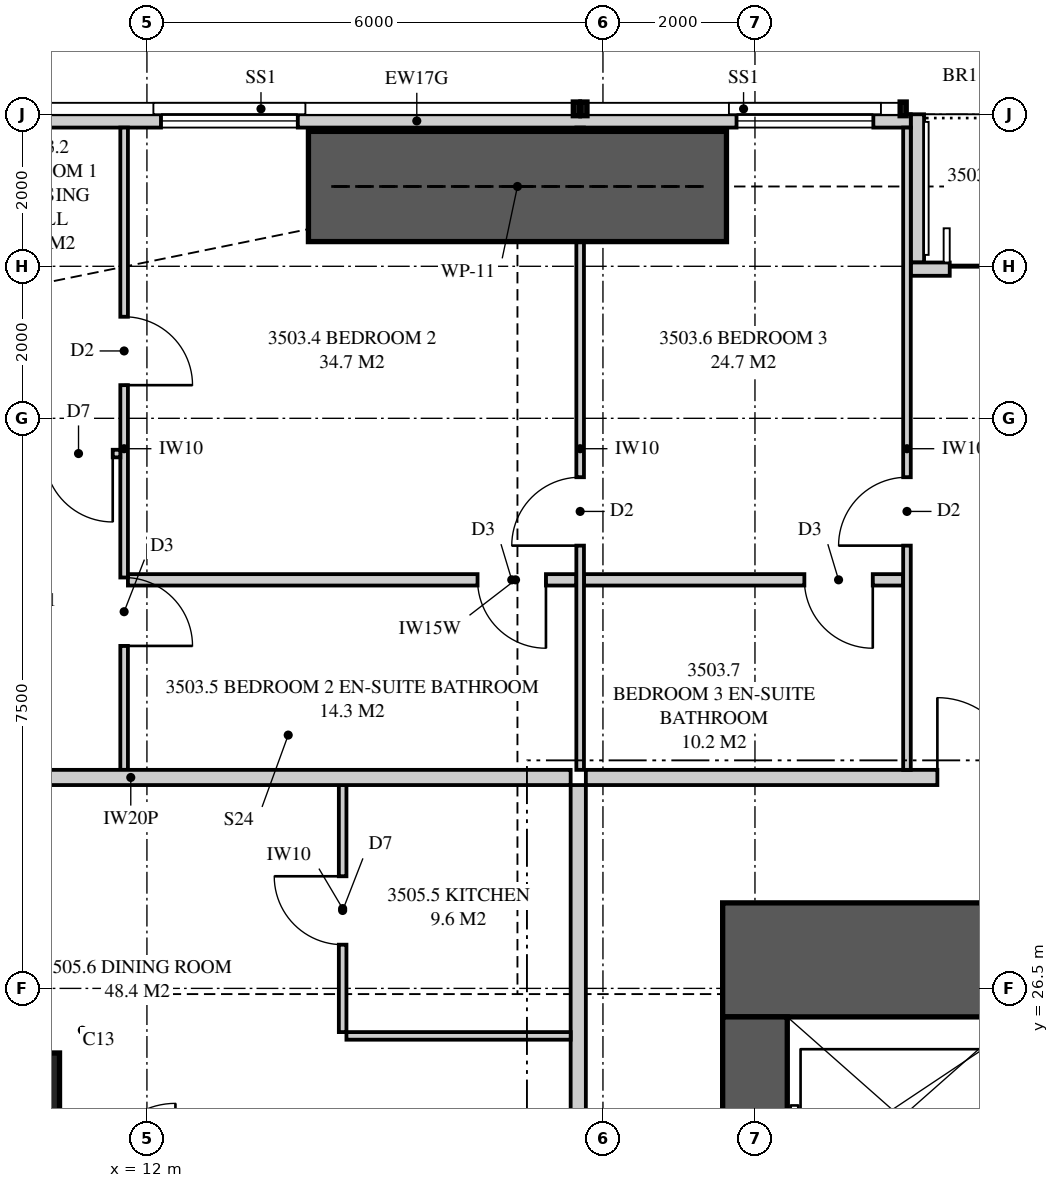
"""IFC4 building model, lengths in metres.
Left out: names, types, materials, properties, quantities, classifications, styles, units other than length and angle.
Written with IfcOpenShell. Run it as: python <this file> out.ifc"""

import sys

from ifc_helpers import new_model, si_unit, direction, frame, frame_2d, origin, origin_2d, place, context, subcontext, project, spatial, polyline, rectangle, outline, extrude, element, fill, save


model = new_model("IFC4")
c1 = context("Model", 3, precision=1e-05, world=origin(), true_north=direction((0.0, 1.0)))
c2 = subcontext(c1, "Body", "Model", "MODEL_VIEW")
j1 = project(units=[si_unit("LENGTHUNIT", "METRE"), si_unit("PLANEANGLEUNIT", "RADIAN")], contexts=[c1])
p1 = place(None, origin())
s1 = spatial("IfcSite", under=j1, at=p1, CompositionType="ELEMENT")
p2 = place(p1, origin())
s2 = spatial("IfcBuilding", under=s1, at=p2, CompositionType="ELEMENT")
p3 = place(p2, frame((0.0, 0.0, 128.3)))
s3 = spatial("IfcBuildingStorey", under=s2, at=p3, CompositionType="ELEMENT", Elevation=128.3)
p4 = place(p3, frame((10.2, 25.0, 0.0), z_axis=(0.0, 0.0, 1.0), x_axis=(1.0, 0.0, 0.0)))
e1 = element("IfcColumn", 1, at=p4, inside=s3, PredefinedType="COLUMN", context=c2, shape_type="SweptSolid", body=[
    extrude(rectangle(XDim=1.3, YDim=1.3, at=origin_2d()), origin(), (0.0, 0.0, 1.0), 3.35),
])
p5 = place(p3, frame((26.0, 26.875, 0.0), z_axis=(0.0, 0.0, 1.0), x_axis=(-1.0, 0.0, 0.0)))
e2 = element("IfcWall", 2, at=p5, inside=s3, PredefinedType="SHEAR", context=c2, shape_type="SweptSolid", body=[
    extrude(rectangle(XDim=6.425, YDim=1.5, at=frame_2d((3.212, 0.0))), origin(), (0.0, 0.0, 1.0), 3.35),
])
p6 = place(p5, frame((0.825, 0.0, 0.0)))
e3 = element("IfcOpeningElement", 3, at=p6, cuts=e2, PredefinedType="OPENING", context=c2, shape_type="SweptSolid", body=[
    extrude(rectangle(XDim=0.75, YDim=2.1, at=frame_2d((0.375, 1.05))), frame((0.0, 0.76, 0.0), z_axis=(0.0, -1.0, 0.0), x_axis=(1.0, 0.0, 0.0)), (0.0, 0.0, 1.0), 1.52),
])
p7 = place(p3, frame((20.0, 26.125, 0.0), z_axis=(0.0, 0.0, 1.0), x_axis=(0.0, -1.0, 0.0)))
e4 = element("IfcWall", 4, at=p7, inside=s3, PredefinedType="SHEAR", context=c2, shape_type="SweptSolid", body=[
    extrude(rectangle(XDim=2.825, YDim=0.85, at=frame_2d((1.413, 0.0))), origin(), (0.0, 0.0, 1.0), 3.35),
])
p8 = place(p3, frame((22.05, 37.913, 0.0), z_axis=(0.0, 0.0, 1.0), x_axis=(-1.0, 0.0, 0.0)))
e5 = element("IfcWall", 5, at=p8, inside=s3, PredefinedType="SOLIDWALL", context=c2, shape_type="SweptSolid", body=[
    extrude(outline(polyline([(0.0, 0.0), (12.999, 0.0), (12.999, 3.11), (5.378, 3.11), (5.378, 2.15), (5.333, 2.15), (5.333, 3.11), (5.175, 3.11), (5.175, 2.15), (0.0, 2.15), (0.0, 0.0)])), frame((0.0, 0.087, 0.0), z_axis=(0.0, -1.0, 0.0), x_axis=(1.0, 0.0, 0.0)), (0.0, 0.0, 1.0), 0.175),
])
p9 = place(p8, frame((0.492, 0.0, 0.4)))
e6 = element("IfcOpeningElement", 6, at=p9, cuts=e5, PredefinedType="OPENING", context=c2, shape_type="SweptSolid", body=[
    extrude(rectangle(XDim=1.8, YDim=1.7, at=frame_2d((0.9, 0.85))), frame((0.0, 0.097, 0.0), z_axis=(0.0, -1.0, 0.0), x_axis=(1.0, 0.0, 0.0)), (0.0, 0.0, 1.0), 0.195),
])
p10 = place(p8, frame((8.065, 0.0, 0.4)))
e7 = element("IfcOpeningElement", 7, at=p10, cuts=e5, PredefinedType="OPENING", context=c2, shape_type="SweptSolid", body=[
    extrude(rectangle(XDim=1.8, YDim=1.7, at=frame_2d((0.9, 0.85))), frame((0.0, 0.097, 0.0), z_axis=(0.0, -1.0, 0.0), x_axis=(1.0, 0.0, 0.0)), (0.0, 0.0, 1.0), 0.195),
])
p11 = place(p3, frame((24.875, 35.962, 0.0), z_axis=(0.0, 0.0, 1.0), x_axis=(-1.0, 0.0, 0.0)))
e8 = element("IfcWall", 8, at=p11, inside=s3, PredefinedType="SOLIDWALL", context=c2, shape_type="SweptSolid", body=[
    extrude(rectangle(XDim=2.825, YDim=0.175, at=frame_2d((1.413, 0.0))), origin(), (0.0, 0.0, 1.0), 3.11),
])
p12 = place(p11, frame((0.512, 0.0, 0.0)))
e9 = element("IfcOpeningElement", 9, at=p12, cuts=e8, PredefinedType="OPENING", context=c2, shape_type="SweptSolid", body=[
    extrude(rectangle(XDim=1.8, YDim=2.1, at=frame_2d((0.9, 1.05))), frame((0.0, 0.097, 0.0), z_axis=(0.0, -1.0, 0.0), x_axis=(1.0, 0.0, 0.0)), (0.0, 0.0, 1.0), 0.195),
])
p13 = place(p3, frame((22.137, 38.0, 0.0), z_axis=(0.0, 0.0, 1.0), x_axis=(0.0, -1.0, 0.0)))
e10 = element("IfcWall", 10, at=p13, inside=s3, PredefinedType="SOLIDWALL", context=c2, shape_type="SweptSolid", body=[
    extrude(outline(polyline([(0.0, 0.0), (1.95, 0.0), (1.95, 3.11), (1.75, 3.11), (1.75, 2.15), (0.15, 2.15), (0.15, 3.11), (0.0, 3.11), (0.0, 0.0)])), frame((0.0, 0.087, 0.0), z_axis=(0.0, -1.0, 0.0), x_axis=(1.0, 0.0, 0.0)), (0.0, 0.0, 1.0), 0.175),
])
p14 = place(p3, frame((17.775, 29.275, 0.0), z_axis=(0.0, 0.0, 1.0), x_axis=(1.0, 0.0, 0.0)))
e11 = element("IfcWall", 11, at=p14, inside=s3, PredefinedType="PARTITIONING", context=c2, shape_type="SweptSolid", body=[
    extrude(outline(polyline([(0.0, 0.0), (11.425, 0.0), (11.425, 3.11), (10.312, 3.11), (10.312, 2.541), (9.638, 2.541), (9.638, 3.11), (0.0, 3.11), (0.0, 0.0)])), frame((0.0, 0.1, 0.0), z_axis=(0.0, -1.0, 0.0), x_axis=(1.0, 0.0, 0.0)), (0.0, 0.0, 1.0), 0.2),
])
p15 = place(p14, frame((4.625, 0.0, 0.0)))
e12 = element("IfcOpeningElement", 12, at=p15, cuts=e11, PredefinedType="OPENING", context=c2, shape_type="SweptSolid", body=[
    extrude(rectangle(XDim=1.05, YDim=2.2, at=frame_2d((0.525, 1.1))), frame((0.0, 0.11, 0.0), z_axis=(0.0, -1.0, 0.0), x_axis=(1.0, 0.0, 0.0)), (0.0, 0.0, 1.0), 0.22),
])
p16 = place(p3, frame((11.7, 37.825, 0.0), z_axis=(0.0, 0.0, 1.0), x_axis=(0.0, -1.0, 0.0)))
e13 = element("IfcWall", 13, at=p16, inside=s3, PredefinedType="PARTITIONING", context=c2, shape_type="SweptSolid", body=[
    extrude(outline(polyline([(0.0, 0.0), (8.45, 0.0), (8.45, 3.11), (2.708, 3.11), (2.708, 2.15), (0.953, 2.15), (0.953, 3.11), (0.0, 3.11), (0.0, 0.0)])), frame((0.0, 0.05, 0.0), z_axis=(0.0, -1.0, 0.0), x_axis=(1.0, 0.0, 0.0)), (0.0, 0.0, 1.0), 0.1),
])
p17 = place(p16, frame((2.489, 0.0, 0.0)))
e14 = element("IfcOpeningElement", 14, at=p17, cuts=e13, PredefinedType="OPENING", context=c2, shape_type="SweptSolid", body=[
    extrude(rectangle(XDim=0.9, YDim=2.1, at=frame_2d((0.45, 1.05))), frame((0.0, 0.06, 0.0), z_axis=(0.0, -1.0, 0.0), x_axis=(1.0, 0.0, 0.0)), (0.0, 0.0, 1.0), 0.12),
])
p18 = place(p16, frame((5.919, 0.0, 0.0)))
e15 = element("IfcOpeningElement", 15, at=p18, cuts=e13, PredefinedType="OPENING", context=c2, shape_type="SweptSolid", body=[
    extrude(rectangle(XDim=0.9, YDim=2.1, at=frame_2d((0.45, 1.05))), frame((0.0, 0.06, 0.0), z_axis=(0.0, -1.0, 0.0), x_axis=(1.0, 0.0, 0.0)), (0.0, 0.0, 1.0), 0.12),
])
p19 = place(p3, frame((17.7, 37.825, 0.0), z_axis=(0.0, 0.0, 1.0), x_axis=(0.0, -1.0, 0.0)))
e16 = element("IfcWall", 16, at=p19, inside=s3, PredefinedType="PARTITIONING", context=c2, shape_type="SweptSolid", body=[
    extrude(outline(polyline([(1.635, 2.15), (0.0, 2.15), (0.0, 0.0), (8.45, 0.0), (8.45, 3.11), (1.635, 3.11), (1.635, 2.15)]), holes=[polyline([(1.021, 0.116), (0.529, 0.116), (0.529, 0.906), (1.021, 0.906), (1.021, 0.116)]), polyline([(1.021, 1.244), (0.529, 1.244), (0.529, 2.034), (1.021, 2.034), (1.021, 1.244)])]), frame((0.0, 0.05, 0.0), z_axis=(0.0, -1.0, 0.0), x_axis=(1.0, 0.0, 0.0)), (0.0, 0.0, 1.0), 0.1),
])
p20 = place(p19, frame((4.6, 0.0, 0.0)))
e17 = element("IfcOpeningElement", 17, at=p20, cuts=e16, PredefinedType="OPENING", context=c2, shape_type="SweptSolid", body=[
    extrude(rectangle(XDim=0.9, YDim=2.1, at=frame_2d((0.45, 1.05))), frame((0.0, 0.06, 0.0), z_axis=(0.0, -1.0, 0.0), x_axis=(1.0, 0.0, 0.0)), (0.0, 0.0, 1.0), 0.12),
])
p21 = place(p3, frame((22.0, 37.825, 0.0), z_axis=(0.0, 0.0, 1.0), x_axis=(0.0, -1.0, 0.0)))
e18 = element("IfcWall", 18, at=p21, inside=s3, PredefinedType="PARTITIONING", context=c2, shape_type="SweptSolid", body=[
    extrude(outline(polyline([(0.0, 0.0), (8.45, 0.0), (8.45, 3.11), (1.635, 3.11), (1.635, 2.15), (0.0, 2.15), (0.0, 3.11), (0.0, 0.0)])), frame((0.0, 0.05, 0.0), z_axis=(0.0, -1.0, 0.0), x_axis=(1.0, 0.0, 0.0)), (0.0, 0.0, 1.0), 0.1),
])
p22 = place(p21, frame((4.6, 0.0, 0.0)))
e19 = element("IfcOpeningElement", 19, at=p22, cuts=e18, PredefinedType="OPENING", context=c2, shape_type="SweptSolid", body=[
    extrude(rectangle(XDim=0.9, YDim=2.1, at=frame_2d((0.45, 1.05))), frame((0.0, 0.06, 0.0), z_axis=(0.0, -1.0, 0.0), x_axis=(1.0, 0.0, 0.0)), (0.0, 0.0, 1.0), 0.12),
])
p23 = place(p3, frame((6.0, 33.536, 0.0), z_axis=(0.0, 0.0, 1.0), x_axis=(1.0, 0.0, 0.0)))
e20 = element("IfcWall", 20, at=p23, inside=s3, PredefinedType="PARTITIONING", context=c2, shape_type="SweptSolid", body=[
    extrude(outline(polyline([(0.0, 0.0), (5.65, 0.0), (5.65, 3.11), (5.46, 3.11), (5.46, 2.51), (3.206, 2.51), (3.206, 2.15), (1.463, 2.15), (1.463, 3.11), (0.0, 3.11), (0.0, 0.0)])), frame((0.0, 0.05, 0.0), z_axis=(0.0, -1.0, 0.0), x_axis=(1.0, 0.0, 0.0)), (0.0, 0.0, 1.0), 0.1),
])
p24 = place(p23, frame((4.65, 0.0, 0.0)))
e21 = element("IfcOpeningElement", 21, at=p24, cuts=e20, PredefinedType="OPENING", context=c2, shape_type="SweptSolid", body=[
    extrude(rectangle(XDim=0.9, YDim=2.1, at=frame_2d((0.45, 1.05))), frame((0.0, 0.06, 0.0), z_axis=(0.0, -1.0, 0.0), x_axis=(1.0, 0.0, 0.0)), (0.0, 0.0, 1.0), 0.12),
])
p25 = place(p3, frame((11.75, 31.875, 0.0), z_axis=(0.0, 0.0, 1.0), x_axis=(1.0, 0.0, 0.0)))
e22 = element("IfcWall", 22, at=p25, inside=s3, PredefinedType="PLUMBINGWALL", context=c2, shape_type="SweptSolid", body=[
    extrude(outline(polyline([(0.0, 0.0), (5.9, 0.0), (5.9, 3.11), (5.438, 3.11), (5.438, 2.541), (4.812, 2.541), (4.812, 3.11), (0.0, 3.11), (0.0, 0.0)])), frame((0.0, 0.075, 0.0), z_axis=(0.0, -1.0, 0.0), x_axis=(1.0, 0.0, 0.0)), (0.0, 0.0, 1.0), 0.15),
])
p26 = place(p25, frame((4.6, 0.0, 0.0)))
e23 = element("IfcOpeningElement", 23, at=p26, cuts=e22, PredefinedType="OPENING", context=c2, shape_type="SweptSolid", body=[
    extrude(rectangle(XDim=0.9, YDim=2.1, at=frame_2d((0.45, 1.05))), frame((0.0, 0.085, 0.0), z_axis=(0.0, -1.0, 0.0), x_axis=(1.0, 0.0, 0.0)), (0.0, 0.0, 1.0), 0.17),
])
p27 = place(p3, frame((17.75, 31.875, 0.0), z_axis=(0.0, 0.0, 1.0), x_axis=(1.0, 0.0, 0.0)))
e24 = element("IfcWall", 24, at=p27, inside=s3, PredefinedType="PLUMBINGWALL", context=c2, shape_type="SweptSolid", body=[
    extrude(rectangle(XDim=4.2, YDim=0.15, at=frame_2d((2.1, 0.0))), origin(), (0.0, 0.0, 1.0), 3.11),
])
p28 = place(p27, frame((2.9, 0.0, 0.0)))
e25 = element("IfcOpeningElement", 25, at=p28, cuts=e24, PredefinedType="OPENING", context=c2, shape_type="SweptSolid", body=[
    extrude(rectangle(XDim=0.9, YDim=2.1, at=frame_2d((0.45, 1.05))), frame((0.0, 0.085, 0.0), z_axis=(0.0, -1.0, 0.0), x_axis=(1.0, 0.0, 0.0)), (0.0, 0.0, 1.0), 0.17),
])
p29 = place(p3, frame((6.0, 29.275, 0.0), z_axis=(0.0, 0.0, 1.0), x_axis=(1.0, 0.0, 0.0)))
e26 = element("IfcWall", 26, at=p29, inside=s3, PredefinedType="PARTITIONING", context=c2, shape_type="SweptSolid", body=[
    extrude(outline(polyline([(0.0, 0.0), (11.575, 0.0), (11.575, 3.11), (11.212, 3.11), (11.212, 2.541), (10.538, 2.541), (10.538, 3.11), (5.51, 3.11), (5.51, 2.51), (2.969, 2.51), (2.969, 2.541), (2.565, 2.541), (2.565, 2.15), (0.721, 2.15), (0.721, 3.11), (0.0, 3.11), (0.0, 0.0)])), frame((0.0, 0.1, 0.0), z_axis=(0.0, -1.0, 0.0), x_axis=(1.0, 0.0, 0.0)), (0.0, 0.0, 1.0), 0.2),
])
p30 = place(p3, frame((14.575, 25.925, 0.0), z_axis=(0.0, 0.0, 1.0), x_axis=(0.0, 1.0, 0.0)))
e27 = element("IfcWall", 27, at=p30, inside=s3, PredefinedType="PARTITIONING", context=c2, shape_type="SweptSolid", body=[
    extrude(outline(polyline([(0.0, 0.0), (3.25, 0.0), (3.25, 3.11), (0.787, 3.11), (0.787, 2.541), (0.213, 2.541), (0.213, 3.11), (0.0, 3.11), (0.0, 0.0)])), frame((0.0, 0.05, 0.0), z_axis=(0.0, -1.0, 0.0), x_axis=(1.0, 0.0, 0.0)), (0.0, 0.0, 1.0), 0.1),
])
p31 = place(p30, frame((1.15, 0.0, 0.0)))
e28 = element("IfcOpeningElement", 28, at=p31, cuts=e27, PredefinedType="OPENING", context=c2, shape_type="SweptSolid", body=[
    extrude(rectangle(XDim=0.9, YDim=2.1, at=frame_2d((0.45, 1.05))), frame((0.0, 0.06, 0.0), z_axis=(0.0, -1.0, 0.0), x_axis=(1.0, 0.0, 0.0)), (0.0, 0.0, 1.0), 0.12),
])
p32 = place(p3, frame((14.625, 25.875, 0.0), z_axis=(0.0, 0.0, 1.0), x_axis=(1.0, 0.0, 0.0)))
e29 = element("IfcWall", 29, at=p32, inside=s3, PredefinedType="PARTITIONING", context=c2, shape_type="SweptSolid", body=[
    extrude(rectangle(XDim=2.95, YDim=0.1, at=frame_2d((1.475, 0.0))), origin(), (0.0, 0.0, 1.0), 3.11),
])
p33 = place(p3, frame((17.675, 23.613, 0.0), z_axis=(0.0, 0.0, 1.0), x_axis=(0.0, 1.0, 0.0)))
e30 = element("IfcWall", 30, at=p33, inside=s3, PredefinedType="PARTITIONING", context=c2, shape_type="SweptSolid", body=[
    extrude(outline(polyline([(0.0, 0.0), (5.562, 0.0), (5.562, 3.11), (3.15, 3.11), (3.15, 2.541), (2.475, 2.541), (2.475, 3.11), (0.0, 3.11), (0.0, 0.0)])), frame((0.0, 0.1, 0.0), z_axis=(0.0, -1.0, 0.0), x_axis=(1.0, 0.0, 0.0)), (0.0, 0.0, 1.0), 0.2),
])
p34 = place(p3, frame((14.125, 37.05, 0.0), z_axis=(0.0, 0.0, 1.0), x_axis=(1.0, 0.0, 0.0)))
e31 = element("IfcWall", 31, at=p34, inside=s3, PredefinedType="SHEAR", context=c2, shape_type="SweptSolid", body=[
    extrude(rectangle(XDim=5.5, YDim=1.45, at=frame_2d((2.75, 0.0))), origin(), (0.0, 0.0, 1.0), 3.35),
])
p35 = place(p12, origin())
e32 = element("IfcDoor", 32, at=p35, inside=s3, OperationType="SLIDING_TO_LEFT", PredefinedType="DOOR", context=c2, shape_type="SweptSolid", body=[
    extrude(rectangle(XDim=1.8, YDim=2.1, at=frame_2d((0.9, 1.05))), frame((0.0, 0.025, 0.0), z_axis=(0.0, -1.0, 0.0), x_axis=(1.0, 0.0, 0.0)), (0.0, 0.0, 1.0), 0.05),
])
fill(e9, e32)
p36 = place(p9, origin())
e33 = element("IfcWindow", 33, at=p36, inside=s3, PartitioningType="SINGLE_PANEL", PredefinedType="WINDOW", context=c2, shape_type="SweptSolid", body=[
    extrude(rectangle(XDim=1.8, YDim=1.7, at=frame_2d((0.9, 0.85))), frame((0.0, 0.03, 0.0), z_axis=(0.0, -1.0, 0.0), x_axis=(1.0, 0.0, 0.0)), (0.0, 0.0, 1.0), 0.06),
])
fill(e6, e33)
p37 = place(p10, origin())
e34 = element("IfcWindow", 34, at=p37, inside=s3, PartitioningType="SINGLE_PANEL", PredefinedType="WINDOW", context=c2, shape_type="SweptSolid", body=[
    extrude(rectangle(XDim=1.8, YDim=1.7, at=frame_2d((0.9, 0.85))), frame((0.0, 0.03, 0.0), z_axis=(0.0, -1.0, 0.0), x_axis=(1.0, 0.0, 0.0)), (0.0, 0.0, 1.0), 0.06),
])
fill(e7, e34)
p38 = place(p15, origin())
e35 = element("IfcDoor", 35, at=p38, inside=s3, OperationType="SINGLE_SWING_LEFT", PredefinedType="DOOR", context=c2, shape_type="SweptSolid", body=[
    extrude(rectangle(XDim=1.05, YDim=2.2, at=frame_2d((0.525, 1.1))), frame((0.0, 0.025, 0.0), z_axis=(0.0, -1.0, 0.0), x_axis=(1.0, 0.0, 0.0)), (0.0, 0.0, 1.0), 0.05),
])
fill(e12, e35)
p39 = place(p24, frame((0.9, 0.0, 0.0), z_axis=(0.0, 0.0, 1.0), x_axis=(-1.0, 0.0, 0.0)))
e36 = element("IfcDoor", 36, at=p39, inside=s3, OperationType="SINGLE_SWING_LEFT", PredefinedType="DOOR", context=c2, shape_type="SweptSolid", body=[
    extrude(rectangle(XDim=0.9, YDim=2.1, at=frame_2d((0.45, 1.05))), frame((0.0, 0.025, 0.0), z_axis=(0.0, -1.0, 0.0), x_axis=(1.0, 0.0, 0.0)), (0.0, 0.0, 1.0), 0.05),
])
fill(e21, e36)
p40 = place(p17, origin())
e37 = element("IfcDoor", 37, at=p40, inside=s3, OperationType="SINGLE_SWING_RIGHT", PredefinedType="DOOR", context=c2, shape_type="SweptSolid", body=[
    extrude(rectangle(XDim=0.9, YDim=2.1, at=frame_2d((0.45, 1.05))), frame((0.0, 0.025, 0.0), z_axis=(0.0, -1.0, 0.0), x_axis=(1.0, 0.0, 0.0)), (0.0, 0.0, 1.0), 0.05),
])
fill(e14, e37)
p41 = place(p20, frame((0.9, 0.0, 0.0), z_axis=(0.0, 0.0, 1.0), x_axis=(-1.0, 0.0, 0.0)))
e38 = element("IfcDoor", 38, at=p41, inside=s3, OperationType="SINGLE_SWING_LEFT", PredefinedType="DOOR", context=c2, shape_type="SweptSolid", body=[
    extrude(rectangle(XDim=0.9, YDim=2.1, at=frame_2d((0.45, 1.05))), frame((0.0, 0.025, 0.0), z_axis=(0.0, -1.0, 0.0), x_axis=(1.0, 0.0, 0.0)), (0.0, 0.0, 1.0), 0.05),
])
fill(e17, e38)
p42 = place(p26, frame((0.9, 0.0, 0.0), z_axis=(0.0, 0.0, 1.0), x_axis=(-1.0, 0.0, 0.0)))
e39 = element("IfcDoor", 39, at=p42, inside=s3, OperationType="SINGLE_SWING_LEFT", PredefinedType="DOOR", context=c2, shape_type="SweptSolid", body=[
    extrude(rectangle(XDim=0.9, YDim=2.1, at=frame_2d((0.45, 1.05))), frame((0.0, 0.025, 0.0), z_axis=(0.0, -1.0, 0.0), x_axis=(1.0, 0.0, 0.0)), (0.0, 0.0, 1.0), 0.05),
])
fill(e23, e39)
p43 = place(p22, frame((0.9, 0.0, 0.0), z_axis=(0.0, 0.0, 1.0), x_axis=(-1.0, 0.0, 0.0)))
e40 = element("IfcDoor", 40, at=p43, inside=s3, OperationType="SINGLE_SWING_LEFT", PredefinedType="DOOR", context=c2, shape_type="SweptSolid", body=[
    extrude(rectangle(XDim=0.9, YDim=2.1, at=frame_2d((0.45, 1.05))), frame((0.0, 0.025, 0.0), z_axis=(0.0, -1.0, 0.0), x_axis=(1.0, 0.0, 0.0)), (0.0, 0.0, 1.0), 0.05),
])
fill(e19, e40)
p44 = place(p28, frame((0.9, 0.0, 0.0), z_axis=(0.0, 0.0, 1.0), x_axis=(-1.0, 0.0, 0.0)))
e41 = element("IfcDoor", 41, at=p44, inside=s3, OperationType="SINGLE_SWING_LEFT", PredefinedType="DOOR", context=c2, shape_type="SweptSolid", body=[
    extrude(rectangle(XDim=0.9, YDim=2.1, at=frame_2d((0.45, 1.05))), frame((0.0, 0.025, 0.0), z_axis=(0.0, -1.0, 0.0), x_axis=(1.0, 0.0, 0.0)), (0.0, 0.0, 1.0), 0.05),
])
fill(e25, e41)
p45 = place(p18, origin())
e42 = element("IfcDoor", 42, at=p45, inside=s3, OperationType="SINGLE_SWING_RIGHT", PredefinedType="DOOR", context=c2, shape_type="SweptSolid", body=[
    extrude(rectangle(XDim=0.9, YDim=2.1, at=frame_2d((0.45, 1.05))), frame((0.0, 0.025, 0.0), z_axis=(0.0, -1.0, 0.0), x_axis=(1.0, 0.0, 0.0)), (0.0, 0.0, 1.0), 0.05),
])
fill(e15, e42)
p46 = place(p31, origin())
e43 = element("IfcDoor", 43, at=p46, inside=s3, OperationType="SINGLE_SWING_RIGHT", PredefinedType="DOOR", context=c2, shape_type="SweptSolid", body=[
    extrude(rectangle(XDim=0.9, YDim=2.1, at=frame_2d((0.45, 1.05))), frame((0.0, 0.025, 0.0), z_axis=(0.0, -1.0, 0.0), x_axis=(1.0, 0.0, 0.0)), (0.0, 0.0, 1.0), 0.05),
])
fill(e28, e43)
save(model, sys.argv[1])
